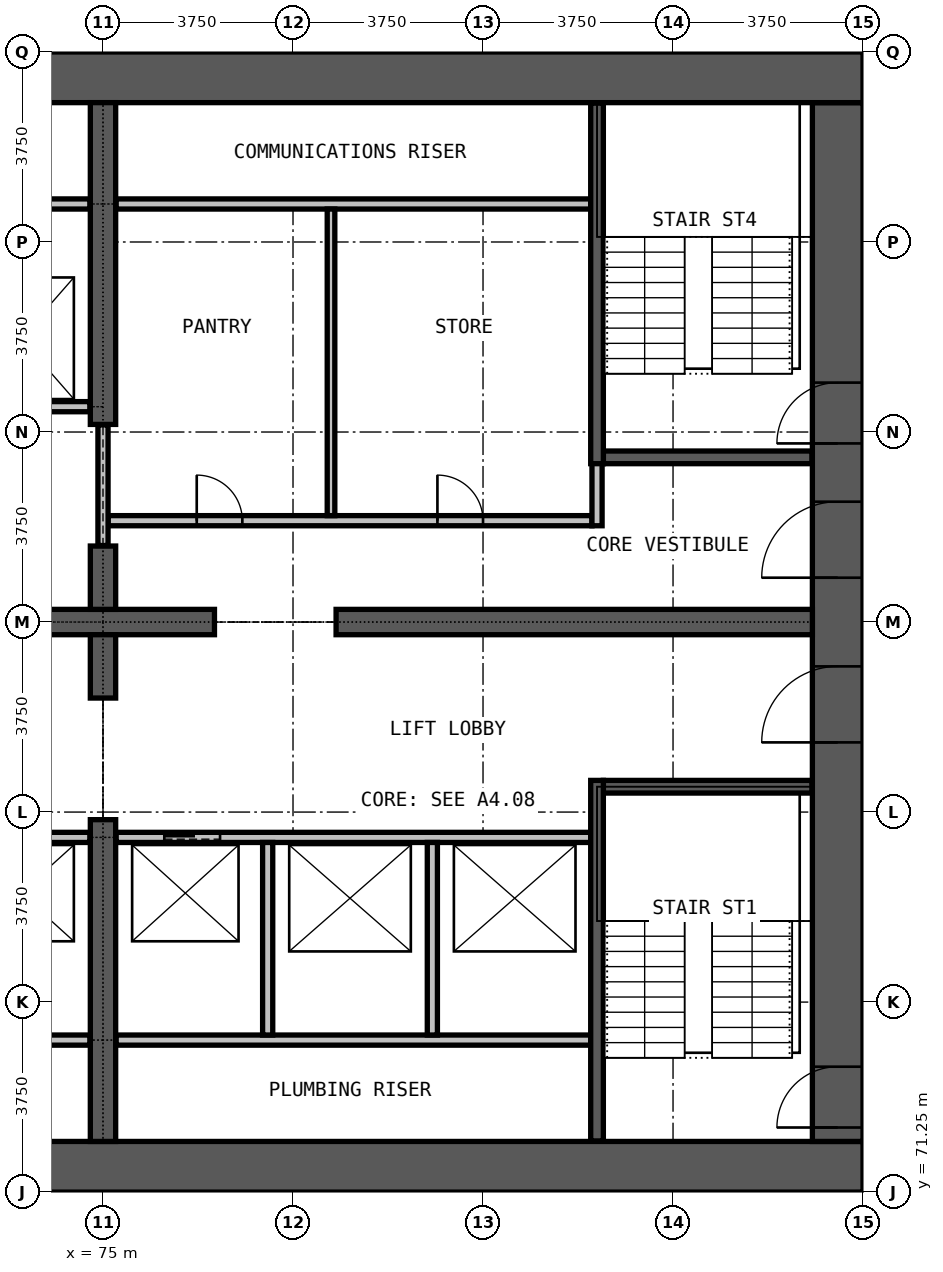
"""IFC4 building model, lengths in metres.
Left out: names, types, materials, properties, quantities, classifications, styles, units other than length and angle.
Written with IfcOpenShell. Run it as: python <this file> out.ifc"""

import sys

from ifc_helpers import new_model, si_unit, direction, frame, frame_2d, origin, place, context, subcontext, project, spatial, rectangle, extrude, element, fill, save


model = new_model("IFC4")
c1 = context("Model", 3, precision=1e-05, world=origin(), true_north=direction((0.0, 1.0)))
c2 = subcontext(c1, "Body", "Model", "MODEL_VIEW")
j1 = project(units=[si_unit("LENGTHUNIT", "METRE"), si_unit("PLANEANGLEUNIT", "RADIAN")], contexts=[c1])
p1 = place(None, origin())
s1 = spatial("IfcSite", under=j1, at=p1, CompositionType="ELEMENT")
p2 = place(p1, origin())
s2 = spatial("IfcBuilding", under=s1, at=p2, CompositionType="ELEMENT")
p3 = place(p2, frame((0.0, 0.0, 65.9)))
s3 = spatial("IfcBuildingStorey", under=s2, at=p3, CompositionType="ELEMENT", Elevation=65.9)
p4 = place(p3, frame((60.0, 71.75, 0.0), z_axis=(0.0, 0.0, 1.0), x_axis=(1.0, 0.0, 0.0)))
e1 = element("IfcWall", 1, at=p4, inside=s3, PredefinedType="SHEAR", context=c2, shape_type="SweptSolid", body=[
    extrude(rectangle(XDim=30.0, YDim=1.0, at=frame_2d((15.0, 0.0))), origin(), (0.0, 0.0, 1.0), 3.3),
])
p5 = place(p3, frame((89.5, 72.25, 0.0), z_axis=(0.0, 0.0, 1.0), x_axis=(0.0, 1.0, 0.0)))
e2 = element("IfcWall", 2, at=p5, inside=s3, PredefinedType="SHEAR", context=c2, shape_type="SweptSolid", body=[
    extrude(rectangle(XDim=20.5, YDim=1.0, at=frame_2d((10.25, 0.0))), origin(), (0.0, 0.0, 1.0), 3.3),
])
p6 = place(p5, frame((0.275, 0.0, 0.0)))
e3 = element("IfcOpeningElement", 3, at=p6, cuts=e2, PredefinedType="OPENING", context=c2, shape_type="SweptSolid", body=[
    extrude(rectangle(XDim=1.2, YDim=2.2, at=frame_2d((0.6, 1.1))), frame((0.0, 0.51, 0.0), z_axis=(0.0, -1.0, 0.0), x_axis=(1.0, 0.0, 0.0)), (0.0, 0.0, 1.0), 1.02),
])
p7 = place(p5, frame((13.775, 0.0, 0.0)))
e4 = element("IfcOpeningElement", 4, at=p7, cuts=e2, PredefinedType="OPENING", context=c2, shape_type="SweptSolid", body=[
    extrude(rectangle(XDim=1.2, YDim=2.2, at=frame_2d((0.6, 1.1))), frame((0.0, 0.51, 0.0), z_axis=(0.0, -1.0, 0.0), x_axis=(1.0, 0.0, 0.0)), (0.0, 0.0, 1.0), 1.02),
])
p8 = place(p5, frame((7.875, 0.0, 0.0)))
e5 = element("IfcOpeningElement", 5, at=p8, cuts=e2, PredefinedType="OPENING", context=c2, shape_type="SweptSolid", body=[
    extrude(rectangle(XDim=1.5, YDim=2.2, at=frame_2d((0.75, 1.1))), frame((0.0, 0.51, 0.0), z_axis=(0.0, -1.0, 0.0), x_axis=(1.0, 0.0, 0.0)), (0.0, 0.0, 1.0), 1.02),
])
p9 = place(p5, frame((11.125, 0.0, 0.0)))
e6 = element("IfcOpeningElement", 6, at=p9, cuts=e2, PredefinedType="OPENING", context=c2, shape_type="SweptSolid", body=[
    extrude(rectangle(XDim=1.5, YDim=2.2, at=frame_2d((0.75, 1.1))), frame((0.0, 0.51, 0.0), z_axis=(0.0, -1.0, 0.0), x_axis=(1.0, 0.0, 0.0)), (0.0, 0.0, 1.0), 1.02),
])
p10 = place(p3, frame((90.0, 93.25, 0.0), z_axis=(0.0, 0.0, 1.0), x_axis=(-1.0, 0.0, 0.0)))
e7 = element("IfcWall", 7, at=p10, inside=s3, PredefinedType="SHEAR", context=c2, shape_type="SweptSolid", body=[
    extrude(rectangle(XDim=30.0, YDim=1.0, at=frame_2d((15.0, 0.0))), origin(), (0.0, 0.0, 1.0), 3.3),
])
p11 = place(p3, frame((72.8, 82.5, 0.0), z_axis=(0.0, 0.0, 1.0), x_axis=(1.0, 0.0, 0.0)))
e8 = element("IfcWall", 8, at=p11, inside=s3, PredefinedType="SHEAR", context=c2, shape_type="SweptSolid", body=[
    extrude(rectangle(XDim=4.4, YDim=0.5, at=frame_2d((2.2, 0.0))), origin(), (0.0, 0.0, 1.0), 3.3),
])
p12 = place(p3, frame((79.6, 82.5, 0.0), z_axis=(0.0, 0.0, 1.0), x_axis=(1.0, 0.0, 0.0)))
e9 = element("IfcWall", 9, at=p12, inside=s3, PredefinedType="SHEAR", context=c2, shape_type="SweptSolid", body=[
    extrude(rectangle(XDim=9.4, YDim=0.5, at=frame_2d((4.7, 0.0))), origin(), (0.0, 0.0, 1.0), 3.3),
])
p13 = place(p3, frame((75.0, 72.25, 0.0), z_axis=(0.0, 0.0, 1.0), x_axis=(0.0, 1.0, 0.0)))
e10 = element("IfcWall", 10, at=p13, inside=s3, PredefinedType="SHEAR", context=c2, shape_type="SweptSolid", body=[
    extrude(rectangle(XDim=6.35, YDim=0.5, at=frame_2d((3.175, 0.0))), origin(), (0.0, 0.0, 1.0), 3.3),
])
for number, where, z_axis, x_axis in (
    (11, (75.0, 81.0, 0.0), (0.0, 0.0, 1.0), (0.0, 1.0, 0.0)),
    (12, (75.0, 82.75, 0.0), (0.0, 0.0, 1.0), (0.0, 1.0, 0.0)),
):
    element("IfcWall", number, at=place(p3, frame(where, z_axis=z_axis, x_axis=x_axis)), inside=s3, PredefinedType="SHEAR", context=c2, shape_type="SweptSolid", body=[
        extrude(rectangle(XDim=1.25, YDim=0.5, at=frame_2d((0.625, 0.0))), origin(), (0.0, 0.0, 1.0), 3.3),
    ])
p14 = place(p3, frame((75.0, 86.4, 0.0), z_axis=(0.0, 0.0, 1.0), x_axis=(0.0, 1.0, 0.0)))
e13 = element("IfcWall", 13, at=p14, inside=s3, PredefinedType="SHEAR", context=c2, shape_type="SweptSolid", body=[
    extrude(rectangle(XDim=6.35, YDim=0.5, at=frame_2d((3.175, 0.0))), origin(), (0.0, 0.0, 1.0), 3.3),
])
p15 = place(p3, frame((75.1, 84.5, 0.0), z_axis=(0.0, 0.0, 1.0), x_axis=(1.0, 0.0, 0.0)))
e14 = element("IfcWall", 14, at=p15, inside=s3, PredefinedType="PARTITIONING", context=c2, shape_type="SweptSolid", body=[
    extrude(rectangle(XDim=9.55, YDim=0.2, at=frame_2d((4.775, 0.0))), origin(), (0.0, 0.0, 1.0), 3.0),
])
p16 = place(p15, frame((1.75, 0.0, 0.0)))
e15 = element("IfcOpeningElement", 15, at=p16, cuts=e14, PredefinedType="OPENING", context=c2, shape_type="SweptSolid", body=[
    extrude(rectangle(XDim=0.9, YDim=2.2, at=frame_2d((0.45, 1.1))), frame((0.0, 0.11, 0.0), z_axis=(0.0, -1.0, 0.0), x_axis=(1.0, 0.0, 0.0)), (0.0, 0.0, 1.0), 0.22),
])
p17 = place(p15, frame((6.5, 0.0, 0.0)))
e16 = element("IfcOpeningElement", 16, at=p17, cuts=e14, PredefinedType="OPENING", context=c2, shape_type="SweptSolid", body=[
    extrude(rectangle(XDim=0.9, YDim=2.2, at=frame_2d((0.45, 1.1))), frame((0.0, 0.11, 0.0), z_axis=(0.0, -1.0, 0.0), x_axis=(1.0, 0.0, 0.0)), (0.0, 0.0, 1.0), 0.22),
])
p18 = place(p3, frame((75.26, 90.75, 0.0), z_axis=(0.0, 0.0, 1.0), x_axis=(1.0, 0.0, 0.0)))
e17 = element("IfcWall", 17, at=p18, inside=s3, PredefinedType="PARTITIONING", context=c2, shape_type="SweptSolid", body=[
    extrude(rectangle(XDim=9.365, YDim=0.2, at=frame_2d((4.683, 0.0))), origin(), (0.0, 0.0, 1.0), 3.0),
])
p19 = place(p3, frame((75.0, 84.01, 0.0), z_axis=(0.0, 0.0, 1.0), x_axis=(0.0, 1.0, 0.0)))
e18 = element("IfcWall", 18, at=p19, inside=s3, PredefinedType="PARTITIONING", context=c2, shape_type="SweptSolid", body=[
    extrude(rectangle(XDim=2.38, YDim=0.2, at=frame_2d((1.19, 0.0))), origin(), (0.0, 0.0, 1.0), 2.4),
])
p20 = place(p3, frame((84.75, 84.4, 0.0), z_axis=(0.0, 0.0, 1.0), x_axis=(0.0, 1.0, 0.0)))
e19 = element("IfcWall", 19, at=p20, inside=s3, PredefinedType="PARTITIONING", context=c2, shape_type="SweptSolid", body=[
    extrude(rectangle(XDim=1.475, YDim=0.2, at=frame_2d((0.738, 0.0))), origin(), (0.0, 0.0, 1.0), 3.0),
])
p21 = place(p3, frame((79.5, 84.6, 0.0), z_axis=(0.0, 0.0, 1.0), x_axis=(0.0, 1.0, 0.0)))
e20 = element("IfcWall", 20, at=p21, inside=s3, PredefinedType="PARTITIONING", context=c2, shape_type="SweptSolid", body=[
    extrude(rectangle(XDim=6.05, YDim=0.15, at=frame_2d((3.025, 0.0))), origin(), (0.0, 0.0, 1.0), 3.0),
])
for number, where, z_axis, x_axis in (
    (21, (65.375, 74.25, 0.0), (0.0, 0.0, 1.0), (1.0, 0.0, 0.0)),
    (22, (75.26, 74.25, 0.0), (0.0, 0.0, 1.0), (1.0, 0.0, 0.0)),
):
    element("IfcWall", number, at=place(p3, frame(where, z_axis=z_axis, x_axis=x_axis)), inside=s3, PredefinedType="PARTITIONING", context=c2, shape_type="SweptSolid", body=[
        extrude(rectangle(XDim=9.365, YDim=0.2, at=frame_2d((4.683, 0.0))), origin(), (0.0, 0.0, 1.0), 3.0),
    ])
p22 = place(p3, frame((65.375, 78.25, 0.0), z_axis=(0.0, 0.0, 1.0), x_axis=(1.0, 0.0, 0.0)))
e23 = element("IfcWall", 23, at=p22, inside=s3, PredefinedType="PARTITIONING", context=c2, shape_type="SweptSolid", body=[
    extrude(rectangle(XDim=9.365, YDim=0.2, at=frame_2d((4.683, 0.0))), origin(), (0.0, 0.0, 1.0), 3.0),
])
p23 = place(p22, frame((1.0, 0.0, 0.0)))
e24 = element("IfcOpeningElement", 24, at=p23, cuts=e23, PredefinedType="OPENING", context=c2, shape_type="SweptSolid", body=[
    extrude(rectangle(XDim=1.1, YDim=2.2, at=frame_2d((0.55, 1.1))), frame((0.0, 0.11, 0.0), z_axis=(0.0, -1.0, 0.0), x_axis=(1.0, 0.0, 0.0)), (0.0, 0.0, 1.0), 0.22),
])
p24 = place(p22, frame((4.175, 0.0, 0.0)))
e25 = element("IfcOpeningElement", 25, at=p24, cuts=e23, PredefinedType="OPENING", context=c2, shape_type="SweptSolid", body=[
    extrude(rectangle(XDim=1.1, YDim=2.2, at=frame_2d((0.55, 1.1))), frame((0.0, 0.11, 0.0), z_axis=(0.0, -1.0, 0.0), x_axis=(1.0, 0.0, 0.0)), (0.0, 0.0, 1.0), 0.22),
])
p25 = place(p22, frame((7.325, 0.0, 0.0)))
e26 = element("IfcOpeningElement", 26, at=p25, cuts=e23, PredefinedType="OPENING", context=c2, shape_type="SweptSolid", body=[
    extrude(rectangle(XDim=1.1, YDim=2.2, at=frame_2d((0.55, 1.1))), frame((0.0, 0.11, 0.0), z_axis=(0.0, -1.0, 0.0), x_axis=(1.0, 0.0, 0.0)), (0.0, 0.0, 1.0), 0.22),
])
p26 = place(p3, frame((75.26, 78.25, 0.0), z_axis=(0.0, 0.0, 1.0), x_axis=(1.0, 0.0, 0.0)))
e27 = element("IfcWall", 27, at=p26, inside=s3, PredefinedType="PARTITIONING", context=c2, shape_type="SweptSolid", body=[
    extrude(rectangle(XDim=9.365, YDim=0.2, at=frame_2d((4.683, 0.0))), origin(), (0.0, 0.0, 1.0), 3.0),
])
p27 = place(p26, frame((0.95, 0.0, 0.0)))
e28 = element("IfcOpeningElement", 28, at=p27, cuts=e27, PredefinedType="OPENING", context=c2, shape_type="SweptSolid", body=[
    extrude(rectangle(XDim=1.1, YDim=2.2, at=frame_2d((0.55, 1.1))), frame((0.0, 0.11, 0.0), z_axis=(0.0, -1.0, 0.0), x_axis=(1.0, 0.0, 0.0)), (0.0, 0.0, 1.0), 0.22),
])
p28 = place(p3, frame((65.375, 86.75, 0.0), z_axis=(0.0, 0.0, 1.0), x_axis=(1.0, 0.0, 0.0)))
e29 = element("IfcWall", 29, at=p28, inside=s3, PredefinedType="PARTITIONING", context=c2, shape_type="SweptSolid", body=[
    extrude(rectangle(XDim=9.365, YDim=0.2, at=frame_2d((4.683, 0.0))), origin(), (0.0, 0.0, 1.0), 3.0),
])
p29 = place(p28, frame((1.0, 0.0, 0.0)))
e30 = element("IfcOpeningElement", 30, at=p29, cuts=e29, PredefinedType="OPENING", context=c2, shape_type="SweptSolid", body=[
    extrude(rectangle(XDim=1.1, YDim=2.2, at=frame_2d((0.55, 1.1))), frame((0.0, 0.11, 0.0), z_axis=(0.0, -1.0, 0.0), x_axis=(1.0, 0.0, 0.0)), (0.0, 0.0, 1.0), 0.22),
])
p30 = place(p28, frame((4.175, 0.0, 0.0)))
e31 = element("IfcOpeningElement", 31, at=p30, cuts=e29, PredefinedType="OPENING", context=c2, shape_type="SweptSolid", body=[
    extrude(rectangle(XDim=1.1, YDim=2.2, at=frame_2d((0.55, 1.1))), frame((0.0, 0.11, 0.0), z_axis=(0.0, -1.0, 0.0), x_axis=(1.0, 0.0, 0.0)), (0.0, 0.0, 1.0), 0.22),
])
p31 = place(p28, frame((7.325, 0.0, 0.0)))
e32 = element("IfcOpeningElement", 32, at=p31, cuts=e29, PredefinedType="OPENING", context=c2, shape_type="SweptSolid", body=[
    extrude(rectangle(XDim=1.1, YDim=2.2, at=frame_2d((0.55, 1.1))), frame((0.0, 0.11, 0.0), z_axis=(0.0, -1.0, 0.0), x_axis=(1.0, 0.0, 0.0)), (0.0, 0.0, 1.0), 0.22),
])
p32 = place(p3, frame((65.375, 90.75, 0.0), z_axis=(0.0, 0.0, 1.0), x_axis=(1.0, 0.0, 0.0)))
e33 = element("IfcWall", 33, at=p32, inside=s3, PredefinedType="PARTITIONING", context=c2, shape_type="SweptSolid", body=[
    extrude(rectangle(XDim=9.365, YDim=0.2, at=frame_2d((4.683, 0.0))), origin(), (0.0, 0.0, 1.0), 3.0),
])
for number, where, z_axis, x_axis in (
    (34, (78.25, 74.35, 0.0), (0.0, 0.0, 1.0), (0.0, 1.0, 0.0)),
    (35, (81.5, 74.35, 0.0), (0.0, 0.0, 1.0), (0.0, 1.0, 0.0)),
):
    element("IfcWall", number, at=place(p3, frame(where, z_axis=z_axis, x_axis=x_axis)), inside=s3, PredefinedType="PARTITIONING", context=c2, shape_type="SweptSolid", body=[
        extrude(rectangle(XDim=3.8, YDim=0.2, at=frame_2d((1.9, 0.0))), origin(), (0.0, 0.0, 1.0), 3.0),
    ])
for number, where, z_axis, x_axis in (
    (36, (84.875, 79.25, 0.0), (0.0, 0.0, 1.0), (1.0, 0.0, 0.0)),
    (37, (84.875, 85.75, 0.0), (0.0, 0.0, 1.0), (1.0, 0.0, 0.0)),
):
    element("IfcWall", number, at=place(p3, frame(where, z_axis=z_axis, x_axis=x_axis)), inside=s3, PredefinedType="PARTITIONING", context=c2, shape_type="SweptSolid", body=[
        extrude(rectangle(XDim=4.115, YDim=0.25, at=frame_2d((2.058, 0.0))), origin(), (0.0, 0.0, 1.0), 3.0),
    ])
for number, where, z_axis, x_axis in (
    (38, (84.75, 72.26, 0.0), (0.0, 0.0, 1.0), (0.0, 1.0, 0.0)),
    (39, (84.75, 85.625, 0.0), (0.0, 0.0, 1.0), (0.0, 1.0, 0.0)),
):
    element("IfcWall", number, at=place(p3, frame(where, z_axis=z_axis, x_axis=x_axis)), inside=s3, PredefinedType="PARTITIONING", context=c2, shape_type="SweptSolid", body=[
        extrude(rectangle(XDim=7.115, YDim=0.25, at=frame_2d((3.558, 0.0))), origin(), (0.0, 0.0, 1.0), 3.0),
    ])
p33 = place(p27, origin())
e40 = element("IfcDoor", 40, at=p33, inside=s3, OperationType="DOUBLE_DOOR_SLIDING", PredefinedType="DOOR", context=c2, shape_type="SweptSolid", body=[
    extrude(rectangle(XDim=1.1, YDim=2.2, at=frame_2d((0.55, 1.1))), frame((0.0, 0.025, 0.0), z_axis=(0.0, -1.0, 0.0), x_axis=(1.0, 0.0, 0.0)), (0.0, 0.0, 1.0), 0.05),
])
fill(e28, e40)
p34 = place(p6, origin())
e41 = element("IfcDoor", 41, at=p34, inside=s3, OperationType="SINGLE_SWING_LEFT", PredefinedType="DOOR", context=c2, shape_type="SweptSolid", body=[
    extrude(rectangle(XDim=1.2, YDim=2.2, at=frame_2d((0.6, 1.1))), frame((0.0, 0.025, 0.0), z_axis=(0.0, -1.0, 0.0), x_axis=(1.0, 0.0, 0.0)), (0.0, 0.0, 1.0), 0.05),
])
fill(e3, e41)
p35 = place(p7, origin())
e42 = element("IfcDoor", 42, at=p35, inside=s3, OperationType="SINGLE_SWING_LEFT", PredefinedType="DOOR", context=c2, shape_type="SweptSolid", body=[
    extrude(rectangle(XDim=1.2, YDim=2.2, at=frame_2d((0.6, 1.1))), frame((0.0, 0.025, 0.0), z_axis=(0.0, -1.0, 0.0), x_axis=(1.0, 0.0, 0.0)), (0.0, 0.0, 1.0), 0.05),
])
fill(e4, e42)
p36 = place(p8, origin())
e43 = element("IfcDoor", 43, at=p36, inside=s3, OperationType="DOUBLE_DOOR_SINGLE_SWING", PredefinedType="DOOR", context=c2, shape_type="SweptSolid", body=[
    extrude(rectangle(XDim=1.5, YDim=2.2, at=frame_2d((0.75, 1.1))), frame((0.0, 0.025, 0.0), z_axis=(0.0, -1.0, 0.0), x_axis=(1.0, 0.0, 0.0)), (0.0, 0.0, 1.0), 0.05),
])
fill(e5, e43)
p37 = place(p9, origin())
e44 = element("IfcDoor", 44, at=p37, inside=s3, OperationType="DOUBLE_DOOR_SINGLE_SWING", PredefinedType="DOOR", context=c2, shape_type="SweptSolid", body=[
    extrude(rectangle(XDim=1.5, YDim=2.2, at=frame_2d((0.75, 1.1))), frame((0.0, 0.025, 0.0), z_axis=(0.0, -1.0, 0.0), x_axis=(1.0, 0.0, 0.0)), (0.0, 0.0, 1.0), 0.05),
])
fill(e6, e44)
p38 = place(p16, origin())
e45 = element("IfcDoor", 45, at=p38, inside=s3, OperationType="SINGLE_SWING_LEFT", PredefinedType="DOOR", context=c2, shape_type="SweptSolid", body=[
    extrude(rectangle(XDim=0.9, YDim=2.2, at=frame_2d((0.45, 1.1))), frame((0.0, 0.025, 0.0), z_axis=(0.0, -1.0, 0.0), x_axis=(1.0, 0.0, 0.0)), (0.0, 0.0, 1.0), 0.05),
])
fill(e15, e45)
p39 = place(p17, origin())
e46 = element("IfcDoor", 46, at=p39, inside=s3, OperationType="SINGLE_SWING_LEFT", PredefinedType="DOOR", context=c2, shape_type="SweptSolid", body=[
    extrude(rectangle(XDim=0.9, YDim=2.2, at=frame_2d((0.45, 1.1))), frame((0.0, 0.025, 0.0), z_axis=(0.0, -1.0, 0.0), x_axis=(1.0, 0.0, 0.0)), (0.0, 0.0, 1.0), 0.05),
])
fill(e16, e46)
save(model, sys.argv[1])
